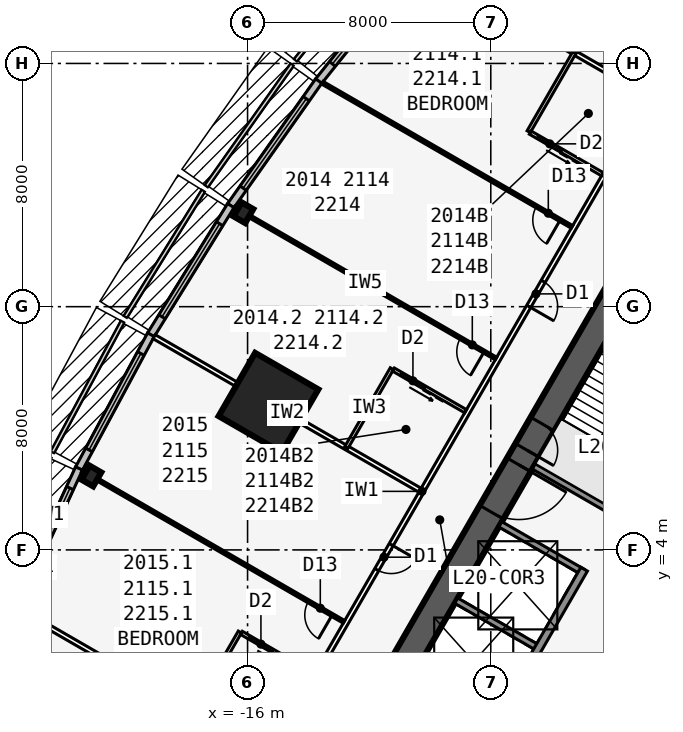
"""IFC4 building model, lengths in metres.
Left out: names, types, materials, properties, quantities, classifications, styles, units other than length and angle.
Written with IfcOpenShell. Run it as: python <this file> out.ifc"""

import sys

from ifc_helpers import new_model, si_unit, direction, frame, frame_2d, origin, origin_2d, place, context, subcontext, project, spatial, rectangle, i_section, extrude, element, fill, save


model = new_model("IFC4")
c1 = context("Model", 3, precision=1e-05, world=origin(), true_north=direction((0.0, 1.0)))
c2 = subcontext(c1, "Body", "Model", "MODEL_VIEW")
j1 = project(units=[si_unit("LENGTHUNIT", "METRE"), si_unit("PLANEANGLEUNIT", "RADIAN")], contexts=[c1])
p1 = place(None, origin())
s1 = spatial("IfcSite", under=j1, at=p1, CompositionType="ELEMENT")
p2 = place(p1, origin())
s2 = spatial("IfcBuilding", under=s1, at=p2, CompositionType="ELEMENT")
p3 = place(p2, frame((0.0, 0.0, 79.5)))
s3 = spatial("IfcBuildingStorey", under=s2, at=p3, CompositionType="ELEMENT", Elevation=79.5)
p4 = place(p3, frame((0.0, 19.052, 0.0), z_axis=(0.0, 0.0, 1.0), x_axis=(-0.499999749417, -0.866025548458, 0.0)))
e1 = element("IfcWall", 1, at=p4, inside=s3, PredefinedType="SHEAR", context=c2, shape_type="SweptSolid", body=[
    extrude(rectangle(XDim=33.0, YDim=0.9, at=frame_2d((16.5, 0.0))), origin(), (0.0, 0.0, 1.0), 3.4),
])
p5 = place(p4, frame((14.15, 0.0, 0.0)))
e2 = element("IfcOpeningElement", 2, at=p5, cuts=e1, PredefinedType="OPENING", context=c2, shape_type="SweptSolid", body=[
    extrude(rectangle(XDim=1.8, YDim=2.13, at=frame_2d((0.9, 1.065))), frame((0.0, 0.46, 0.0), z_axis=(0.0, -1.0, 0.0), x_axis=(1.0, 0.0, 0.0)), (0.0, 0.0, 1.0), 0.92),
])
p6 = place(p4, frame((12.6, 0.0, 0.0)))
e3 = element("IfcOpeningElement", 3, at=p6, cuts=e1, PredefinedType="OPENING", context=c2, shape_type="SweptSolid", body=[
    extrude(rectangle(XDim=1.0, YDim=2.13, at=frame_2d((0.5, 1.065))), frame((0.0, 0.46, 0.0), z_axis=(0.0, -1.0, 0.0), x_axis=(1.0, 0.0, 0.0)), (0.0, 0.0, 1.0), 0.92),
])
p7 = place(p3, frame((-4.929, 3.365, 0.0), z_axis=(0.0, 0.0, 1.0), x_axis=(-0.499991433582, -0.866030349552, 0.0)))
e4 = element("IfcWall", 4, at=p7, inside=s3, PredefinedType="SOLIDWALL", context=c2, shape_type="SweptSolid", body=[
    extrude(rectangle(XDim=10.633, YDim=0.25, at=frame_2d((5.316, 0.0))), origin(), (0.0, 0.0, 1.0), 3.235),
])
p8 = place(p7, frame((9.164, 0.0, 0.0)))
e5 = element("IfcOpeningElement", 5, at=p8, cuts=e4, PredefinedType="OPENING", context=c2, shape_type="SweptSolid", body=[
    extrude(rectangle(XDim=0.9, YDim=2.13, at=frame_2d((0.45, 1.065))), frame((0.0, 0.135, 0.0), z_axis=(0.0, -1.0, 0.0), x_axis=(1.0, 0.0, 0.0)), (0.0, 0.0, 1.0), 0.27),
])
for number, where, z_axis, x_axis in (
    (6, (-3.879, 5.184, 0.0), (0.0, 0.0, 1.0), (-0.866, 0.5, 0.0)),
    (7, (-4.979, 3.279, 0.0), (0.0, 0.0, 1.0), (-0.866, 0.5, 0.0)),
    (8, (-6.429, 0.767, 0.0), (0.0, 0.0, 1.0), (-0.866, 0.5, 0.0)),
):
    element("IfcWall", number, at=place(p3, frame(where, z_axis=z_axis, x_axis=x_axis)), inside=s3, PredefinedType="SOLIDWALL", context=c2, shape_type="SweptSolid", body=[
        extrude(rectangle(XDim=3.125, YDim=0.2, at=frame_2d((1.562, 0.0))), origin(), (0.0, 0.0, 1.0), 3.235),
    ])
for number, where, z_axis, x_axis in (
    (9, (-16.137, 15.09, 0.0), (0.0, 0.0, 1.0), (-0.866, 0.5, 0.0)),
    (10, (-21.137, 6.43, 0.0), (0.0, 0.0, 1.0), (-0.866, 0.5, 0.0)),
):
    element("IfcColumn", number, at=place(p3, frame(where, z_axis=z_axis, x_axis=x_axis)), inside=s3, PredefinedType="COLUMN", context=c2, shape_type="SweptSolid", body=[
        extrude(i_section(OverallWidth=0.442, OverallDepth=0.531, WebThickness=0.066, FlangeThickness=0.106, at=origin_2d()), origin(), (0.0, 0.0, 1.0), 3.4),
    ])
p9 = place(p3, frame((-15.312, 8.84, 0.0), z_axis=(0.0, 0.0, 1.0), x_axis=(-0.866025403784, 0.5, 0.0)))
e11 = element("IfcColumn", 11, at=p9, inside=s3, PredefinedType="COLUMN", context=c2, shape_type="SweptSolid", body=[
    extrude(rectangle(XDim=2.4, YDim=2.4, at=origin_2d()), origin(), (0.0, 0.0, 1.0), 3.4),
])
p10 = place(p3, frame((-10.505, 23.364, 0.0), z_axis=(0.0, 0.0, 1.0), x_axis=(-0.624594965756, -0.780948864364, 0.0)))
e12 = element("IfcWall", 12, at=p10, inside=s3, PredefinedType="STANDARD", context=c2, shape_type="SweptSolid", body=[
    extrude(rectangle(XDim=5.058, YDim=0.25, at=frame_2d((2.529, 0.0))), origin(), (0.0, 0.0, 1.0), 3.235),
])
p11 = place(p10, frame((0.729, 0.0, 0.45)))
e13 = element("IfcOpeningElement", 13, at=p11, cuts=e12, PredefinedType="OPENING", context=c2, shape_type="SweptSolid", body=[
    extrude(rectangle(XDim=3.6, YDim=2.4, at=frame_2d((1.8, 1.2))), frame((0.0, 0.135, 0.0), z_axis=(0.0, -1.0, 0.0), x_axis=(1.0, 0.0, 0.0)), (0.0, 0.0, 1.0), 0.27),
])
p12 = place(p3, frame((-13.659, 19.42, 0.0), z_axis=(0.0, 0.0, 1.0), x_axis=(-0.5766431066, -0.81699616132, 0.0)))
e14 = element("IfcWall", 14, at=p12, inside=s3, PredefinedType="STANDARD", context=c2, shape_type="SweptSolid", body=[
    extrude(rectangle(XDim=5.021, YDim=0.25, at=frame_2d((2.51, 0.0))), origin(), (0.0, 0.0, 1.0), 3.235),
])
p13 = place(p12, frame((0.71, 0.0, 0.45)))
e15 = element("IfcOpeningElement", 15, at=p13, cuts=e14, PredefinedType="OPENING", context=c2, shape_type="SweptSolid", body=[
    extrude(rectangle(XDim=3.6, YDim=2.4, at=frame_2d((1.8, 1.2))), frame((0.0, 0.135, 0.0), z_axis=(0.0, -1.0, 0.0), x_axis=(1.0, 0.0, 0.0)), (0.0, 0.0, 1.0), 0.27),
])
p14 = place(p3, frame((-16.551, 15.324, 0.0), z_axis=(0.0, 0.0, 1.0), x_axis=(-0.526132807704, -0.850402415717, 0.0)))
e16 = element("IfcWall", 16, at=p14, inside=s3, PredefinedType="STANDARD", context=c2, shape_type="SweptSolid", body=[
    extrude(rectangle(XDim=5.002, YDim=0.25, at=frame_2d((2.501, 0.0))), origin(), (0.0, 0.0, 1.0), 3.235),
])
p15 = place(p14, frame((0.701, 0.0, 0.45)))
e17 = element("IfcOpeningElement", 17, at=p15, cuts=e16, PredefinedType="OPENING", context=c2, shape_type="SweptSolid", body=[
    extrude(rectangle(XDim=3.6, YDim=2.4, at=frame_2d((1.8, 1.2))), frame((0.0, 0.135, 0.0), z_axis=(0.0, -1.0, 0.0), x_axis=(1.0, 0.0, 0.0)), (0.0, 0.0, 1.0), 0.27),
])
p16 = place(p3, frame((-19.178, 11.077, 0.0), z_axis=(0.0, 0.0, 1.0), x_axis=(-0.473412820489, -0.880840678782, 0.0)))
e18 = element("IfcWall", 18, at=p16, inside=s3, PredefinedType="STANDARD", context=c2, shape_type="SweptSolid", body=[
    extrude(rectangle(XDim=5.002, YDim=0.25, at=frame_2d((2.501, 0.0))), origin(), (0.0, 0.0, 1.0), 3.235),
])
p17 = place(p16, frame((0.701, 0.0, 0.45)))
e19 = element("IfcOpeningElement", 19, at=p17, cuts=e18, PredefinedType="OPENING", context=c2, shape_type="SweptSolid", body=[
    extrude(rectangle(XDim=3.6, YDim=2.4, at=frame_2d((1.8, 1.2))), frame((0.0, 0.135, 0.0), z_axis=(0.0, -1.0, 0.0), x_axis=(1.0, 0.0, 0.0)), (0.0, 0.0, 1.0), 0.27),
])
p18 = place(p3, frame((-21.543, 6.678, 0.0), z_axis=(0.0, 0.0, 1.0), x_axis=(-0.419203100754, -0.907892482796, 0.0)))
e20 = element("IfcWall", 20, at=p18, inside=s3, PredefinedType="STANDARD", context=c2, shape_type="SweptSolid", body=[
    extrude(rectangle(XDim=5.021, YDim=0.25, at=frame_2d((2.51, 0.0))), origin(), (0.0, 0.0, 1.0), 3.235),
])
p19 = place(p18, frame((0.71, 0.0, 0.45)))
e21 = element("IfcOpeningElement", 21, at=p19, cuts=e20, PredefinedType="OPENING", context=c2, shape_type="SweptSolid", body=[
    extrude(rectangle(XDim=3.6, YDim=2.4, at=frame_2d((1.8, 1.2))), frame((0.0, 0.135, 0.0), z_axis=(0.0, -1.0, 0.0), x_axis=(1.0, 0.0, 0.0)), (0.0, 0.0, 1.0), 0.27),
])
p20 = place(p3, frame((-0.5, 22.836, 0.0), z_axis=(0.0, 0.0, 1.0), x_axis=(-0.500001677587, -0.866024435227, 0.0)))
e22 = element("IfcWall", 22, at=p20, inside=s3, PredefinedType="PARTITIONING", context=c2, shape_type="SweptSolid", body=[
    extrude(rectangle(XDim=39.054, YDim=0.15, at=frame_2d((19.527, 0.0))), origin(), (0.0, 0.0, 1.0), 3.235),
])
p21 = place(p20, frame((0.352, 0.0, 0.0)))
e23 = element("IfcOpeningElement", 23, at=p21, cuts=e22, PredefinedType="OPENING", context=c2, shape_type="SweptSolid", body=[
    extrude(rectangle(XDim=0.95, YDim=2.13, at=frame_2d((0.475, 1.065))), frame((0.0, 0.085, 0.0), z_axis=(0.0, -1.0, 0.0), x_axis=(1.0, 0.0, 0.0)), (0.0, 0.0, 1.0), 0.17),
])
p22 = place(p20, frame((11.552, 0.0, 0.0)))
e24 = element("IfcOpeningElement", 24, at=p22, cuts=e22, PredefinedType="OPENING", context=c2, shape_type="SweptSolid", body=[
    extrude(rectangle(XDim=0.95, YDim=2.13, at=frame_2d((0.475, 1.065))), frame((0.0, 0.085, 0.0), z_axis=(0.0, -1.0, 0.0), x_axis=(1.0, 0.0, 0.0)), (0.0, 0.0, 1.0), 0.17),
])
p23 = place(p20, frame((21.552, 0.0, 0.0)))
e25 = element("IfcOpeningElement", 25, at=p23, cuts=e22, PredefinedType="OPENING", context=c2, shape_type="SweptSolid", body=[
    extrude(rectangle(XDim=0.95, YDim=2.13, at=frame_2d((0.475, 1.065))), frame((0.0, 0.085, 0.0), z_axis=(0.0, -1.0, 0.0), x_axis=(1.0, 0.0, 0.0)), (0.0, 0.0, 1.0), 0.17),
])
p24 = place(p20, frame((36.546, 0.0, 0.0)))
e26 = element("IfcOpeningElement", 26, at=p24, cuts=e22, PredefinedType="OPENING", context=c2, shape_type="SweptSolid", body=[
    extrude(rectangle(XDim=0.95, YDim=2.13, at=frame_2d((0.475, 1.065))), frame((0.0, 0.085, 0.0), z_axis=(0.0, -1.0, 0.0), x_axis=(1.0, 0.0, 0.0)), (0.0, 0.0, 1.0), 0.17),
])
p25 = place(p3, frame((-2.829, 18.954, 0.0), z_axis=(0.0, 0.0, 1.0), x_axis=(-0.866020536561, 0.500008430184, 0.0)))
e27 = element("IfcWall", 27, at=p25, inside=s3, PredefinedType="PARTITIONING", context=c2, shape_type="SweptSolid", body=[
    extrude(rectangle(XDim=8.72, YDim=0.15, at=frame_2d((4.36, 0.0))), origin(), (0.0, 0.0, 1.0), 2.389),
])
p26 = place(p3, frame((-5.329, 14.623, 0.0), z_axis=(0.0, 0.0, 1.0), x_axis=(-0.866018409083, 0.500012114982, 0.0)))
e28 = element("IfcWall", 28, at=p26, inside=s3, PredefinedType="PARTITIONING", context=c2, shape_type="SweptSolid", body=[
    extrude(rectangle(XDim=9.485, YDim=0.1, at=frame_2d((4.742, 0.0))), origin(), (0.0, 0.0, 1.0), 2.389),
])
p27 = place(p26, frame((0.45, 0.0, 0.0)))
e29 = element("IfcOpeningElement", 29, at=p27, cuts=e28, PredefinedType="OPENING", context=c2, shape_type="SweptSolid", body=[
    extrude(rectangle(XDim=0.9, YDim=2.13, at=frame_2d((0.45, 1.065))), frame((0.0, 0.06, 0.0), z_axis=(0.0, -1.0, 0.0), x_axis=(1.0, 0.0, 0.0)), (0.0, 0.0, 1.0), 0.12),
])
p28 = place(p3, frame((-7.829, 10.293, 0.0), z_axis=(0.0, 0.0, 1.0), x_axis=(-0.866016302457, 0.50001576363, 0.0)))
e30 = element("IfcWall", 30, at=p28, inside=s3, PredefinedType="PARTITIONING", context=c2, shape_type="SweptSolid", body=[
    extrude(rectangle(XDim=9.943, YDim=0.1, at=frame_2d((4.972, 0.0))), origin(), (0.0, 0.0, 1.0), 2.389),
])
p29 = place(p28, frame((0.45, 0.0, 0.0)))
e31 = element("IfcOpeningElement", 31, at=p29, cuts=e30, PredefinedType="OPENING", context=c2, shape_type="SweptSolid", body=[
    extrude(rectangle(XDim=0.9, YDim=2.13, at=frame_2d((0.45, 1.065))), frame((0.0, 0.06, 0.0), z_axis=(0.0, -1.0, 0.0), x_axis=(1.0, 0.0, 0.0)), (0.0, 0.0, 1.0), 0.12),
])
p30 = place(p3, frame((-10.329, 5.963, 0.0), z_axis=(0.0, 0.0, 1.0), x_axis=(-0.866021688545, 0.500006434927, 0.0)))
e32 = element("IfcWall", 32, at=p30, inside=s3, PredefinedType="PARTITIONING", context=c2, shape_type="SweptSolid", body=[
    extrude(rectangle(XDim=10.096, YDim=0.15, at=frame_2d((5.048, 0.0))), origin(), (0.0, 0.0, 1.0), 2.389),
])
p31 = place(p3, frame((-12.829, 1.633, 0.0), z_axis=(0.0, 0.0, 1.0), x_axis=(-0.866026934769, 0.499997348248, 0.0)))
e33 = element("IfcWall", 33, at=p31, inside=s3, PredefinedType="PARTITIONING", context=c2, shape_type="SweptSolid", body=[
    extrude(rectangle(XDim=9.943, YDim=0.1, at=frame_2d((4.971, 0.0))), origin(), (0.0, 0.0, 1.0), 2.389),
])
p32 = place(p31, frame((0.45, 0.0, 0.0)))
e34 = element("IfcOpeningElement", 34, at=p32, cuts=e33, PredefinedType="OPENING", context=c2, shape_type="SweptSolid", body=[
    extrude(rectangle(XDim=0.9, YDim=2.13, at=frame_2d((0.45, 1.065))), frame((0.0, 0.06, 0.0), z_axis=(0.0, -1.0, 0.0), x_axis=(1.0, 0.0, 0.0)), (0.0, 0.0, 1.0), 0.12),
])
p33 = place(p3, frame((-15.329, -2.697, 0.0), z_axis=(0.0, 0.0, 1.0), x_axis=(-0.866018409083, 0.500012114982, 0.0)))
e35 = element("IfcWall", 35, at=p33, inside=s3, PredefinedType="PARTITIONING", context=c2, shape_type="SweptSolid", body=[
    extrude(rectangle(XDim=9.485, YDim=0.15, at=frame_2d((4.742, 0.0))), origin(), (0.0, 0.0, 1.0), 2.389),
])
for number, where, z_axis, x_axis in (
    (36, (-3.753, 22.952, 0.0), (0.0, 0.0, 1.0), (-0.5, -0.866, 0.0)),
    (37, (-5.253, 20.354, 0.0), (0.0, 0.0, 1.0), (-0.5, -0.866, 0.0)),
):
    element("IfcWall", number, at=place(p3, frame(where, z_axis=z_axis, x_axis=x_axis)), inside=s3, PredefinedType="PLUMBINGWALL", context=c2, shape_type="SweptSolid", body=[
        extrude(rectangle(XDim=3.0, YDim=0.12, at=frame_2d((1.5, 0.0))), origin(), (0.0, 0.0, 1.0), 3.235),
    ])
p34 = place(p3, frame((-4.329, 16.355, 0.0), z_axis=(0.0, 0.0, 1.0), x_axis=(-0.866035715982, 0.499982138324, 0.0)))
e38 = element("IfcWall", 38, at=p34, inside=s3, PredefinedType="PLUMBINGWALL", context=c2, shape_type="SweptSolid", body=[
    extrude(rectangle(XDim=2.74, YDim=0.12, at=frame_2d((1.37, 0.0))), origin(), (0.0, 0.0, 1.0), 3.235),
])
p35 = place(p34, frame((1.55, 0.0, 0.0)))
e39 = element("IfcOpeningElement", 39, at=p35, cuts=e38, PredefinedType="OPENING", context=c2, shape_type="SweptSolid", body=[
    extrude(rectangle(XDim=0.9, YDim=2.13, at=frame_2d((0.45, 1.065))), frame((0.0, 0.07, 0.0), z_axis=(0.0, -1.0, 0.0), x_axis=(1.0, 0.0, 0.0)), (0.0, 0.0, 1.0), 0.14),
])
p36 = place(p3, frame((-11.253, 9.961, 0.0), z_axis=(0.0, 0.0, 1.0), x_axis=(-0.499990139034, -0.866031096941, 0.0)))
e40 = element("IfcWall", 40, at=p36, inside=s3, PredefinedType="PLUMBINGWALL", context=c2, shape_type="SweptSolid", body=[
    extrude(rectangle(XDim=3.0, YDim=0.12, at=frame_2d((1.5, 0.0))), origin(), (0.0, 0.0, 1.0), 3.235),
])
p37 = place(p3, frame((-8.829, 8.561, 0.0), z_axis=(0.0, 0.0, 1.0), x_axis=(-0.866035715982, 0.499982138324, 0.0)))
e41 = element("IfcWall", 41, at=p37, inside=s3, PredefinedType="PLUMBINGWALL", context=c2, shape_type="SweptSolid", body=[
    extrude(rectangle(XDim=2.74, YDim=0.12, at=frame_2d((1.37, 0.0))), origin(), (0.0, 0.0, 1.0), 3.235),
])
p38 = place(p37, frame((1.55, 0.0, 0.0)))
e42 = element("IfcOpeningElement", 42, at=p38, cuts=e41, PredefinedType="OPENING", context=c2, shape_type="SweptSolid", body=[
    extrude(rectangle(XDim=0.9, YDim=2.13, at=frame_2d((0.45, 1.065))), frame((0.0, 0.07, 0.0), z_axis=(0.0, -1.0, 0.0), x_axis=(1.0, 0.0, 0.0)), (0.0, 0.0, 1.0), 0.14),
])
p39 = place(p3, frame((-16.253, 1.301, 0.0), z_axis=(0.0, 0.0, 1.0), x_axis=(-0.499990139034, -0.866031096941, 0.0)))
e43 = element("IfcWall", 43, at=p39, inside=s3, PredefinedType="PLUMBINGWALL", context=c2, shape_type="SweptSolid", body=[
    extrude(rectangle(XDim=3.0, YDim=0.12, at=frame_2d((1.5, 0.0))), origin(), (0.0, 0.0, 1.0), 3.235),
])
p40 = place(p3, frame((-13.829, -0.099, 0.0), z_axis=(0.0, 0.0, 1.0), x_axis=(-0.865997131366, 0.500048966069, 0.0)))
e44 = element("IfcWall", 44, at=p40, inside=s3, PredefinedType="PLUMBINGWALL", context=c2, shape_type="SweptSolid", body=[
    extrude(rectangle(XDim=2.74, YDim=0.12, at=frame_2d((1.37, 0.0))), origin(), (0.0, 0.0, 1.0), 3.235),
])
p41 = place(p40, frame((1.55, 0.0, 0.0)))
e45 = element("IfcOpeningElement", 45, at=p41, cuts=e44, PredefinedType="OPENING", context=c2, shape_type="SweptSolid", body=[
    extrude(rectangle(XDim=0.9, YDim=2.13, at=frame_2d((0.45, 1.065))), frame((0.0, 0.07, 0.0), z_axis=(0.0, -1.0, 0.0), x_axis=(1.0, 0.0, 0.0)), (0.0, 0.0, 1.0), 0.14),
])
p42 = place(p3, frame((-2.988, 9.978, 0.0), z_axis=(0.0, 0.0, 1.0), x_axis=(-0.499992232847, -0.866029888106, 0.0)))
e46 = element("IfcWall", 46, at=p42, inside=s3, PredefinedType="SOLIDWALL", context=c2, shape_type="SweptSolid", body=[
    extrude(rectangle(XDim=2.794, YDim=0.1, at=frame_2d((1.397, 0.0))), origin(), (0.0, 0.0, 1.0), 3.4),
])
p43 = place(p11, origin())
e47 = element("IfcWindow", 47, at=p43, inside=s3, PartitioningType="SINGLE_PANEL", PredefinedType="WINDOW", context=c2, shape_type="SweptSolid", body=[
    extrude(rectangle(XDim=3.6, YDim=2.4, at=frame_2d((1.8, 1.2))), frame((0.0, 0.03, 0.0), z_axis=(0.0, -1.0, 0.0), x_axis=(1.0, 0.0, 0.0)), (0.0, 0.0, 1.0), 0.06),
])
fill(e13, e47)
p44 = place(p13, origin())
e48 = element("IfcWindow", 48, at=p44, inside=s3, PartitioningType="SINGLE_PANEL", PredefinedType="WINDOW", context=c2, shape_type="SweptSolid", body=[
    extrude(rectangle(XDim=3.6, YDim=2.4, at=frame_2d((1.8, 1.2))), frame((0.0, 0.03, 0.0), z_axis=(0.0, -1.0, 0.0), x_axis=(1.0, 0.0, 0.0)), (0.0, 0.0, 1.0), 0.06),
])
fill(e15, e48)
p45 = place(p15, origin())
e49 = element("IfcWindow", 49, at=p45, inside=s3, PartitioningType="SINGLE_PANEL", PredefinedType="WINDOW", context=c2, shape_type="SweptSolid", body=[
    extrude(rectangle(XDim=3.6, YDim=2.4, at=frame_2d((1.8, 1.2))), frame((0.0, 0.03, 0.0), z_axis=(0.0, -1.0, 0.0), x_axis=(1.0, 0.0, 0.0)), (0.0, 0.0, 1.0), 0.06),
])
fill(e17, e49)
p46 = place(p17, origin())
e50 = element("IfcWindow", 50, at=p46, inside=s3, PartitioningType="SINGLE_PANEL", PredefinedType="WINDOW", context=c2, shape_type="SweptSolid", body=[
    extrude(rectangle(XDim=3.6, YDim=2.4, at=frame_2d((1.8, 1.2))), frame((0.0, 0.03, 0.0), z_axis=(0.0, -1.0, 0.0), x_axis=(1.0, 0.0, 0.0)), (0.0, 0.0, 1.0), 0.06),
])
fill(e19, e50)
p47 = place(p19, origin())
e51 = element("IfcWindow", 51, at=p47, inside=s3, PartitioningType="SINGLE_PANEL", PredefinedType="WINDOW", context=c2, shape_type="SweptSolid", body=[
    extrude(rectangle(XDim=3.6, YDim=2.4, at=frame_2d((1.8, 1.2))), frame((0.0, 0.03, 0.0), z_axis=(0.0, -1.0, 0.0), x_axis=(1.0, 0.0, 0.0)), (0.0, 0.0, 1.0), 0.06),
])
fill(e21, e51)
p48 = place(p27, origin())
e52 = element("IfcDoor", 52, at=p48, inside=s3, OperationType="SINGLE_SWING_LEFT", PredefinedType="DOOR", context=c2, shape_type="SweptSolid", body=[
    extrude(rectangle(XDim=0.9, YDim=2.13, at=frame_2d((0.45, 1.065))), frame((0.0, 0.025, 0.0), z_axis=(0.0, -1.0, 0.0), x_axis=(1.0, 0.0, 0.0)), (0.0, 0.0, 1.0), 0.05),
])
fill(e29, e52)
p49 = place(p29, origin())
e53 = element("IfcDoor", 53, at=p49, inside=s3, OperationType="SINGLE_SWING_LEFT", PredefinedType="DOOR", context=c2, shape_type="SweptSolid", body=[
    extrude(rectangle(XDim=0.9, YDim=2.13, at=frame_2d((0.45, 1.065))), frame((0.0, 0.025, 0.0), z_axis=(0.0, -1.0, 0.0), x_axis=(1.0, 0.0, 0.0)), (0.0, 0.0, 1.0), 0.05),
])
fill(e31, e53)
p50 = place(p32, origin())
e54 = element("IfcDoor", 54, at=p50, inside=s3, OperationType="SINGLE_SWING_LEFT", PredefinedType="DOOR", context=c2, shape_type="SweptSolid", body=[
    extrude(rectangle(XDim=0.9, YDim=2.13, at=frame_2d((0.45, 1.065))), frame((0.0, 0.025, 0.0), z_axis=(0.0, -1.0, 0.0), x_axis=(1.0, 0.0, 0.0)), (0.0, 0.0, 1.0), 0.05),
])
fill(e34, e54)
p51 = place(p35, origin())
e55 = element("IfcDoor", 55, at=p51, inside=s3, OperationType="SLIDING_TO_LEFT", PredefinedType="DOOR", context=c2, shape_type="SweptSolid", body=[
    extrude(rectangle(XDim=0.9, YDim=2.13, at=frame_2d((0.45, 1.065))), frame((0.0, 0.025, 0.0), z_axis=(0.0, -1.0, 0.0), x_axis=(1.0, 0.0, 0.0)), (0.0, 0.0, 1.0), 0.05),
])
fill(e39, e55)
p52 = place(p22, origin())
e56 = element("IfcDoor", 56, at=p52, inside=s3, OperationType="SINGLE_SWING_RIGHT", PredefinedType="DOOR", context=c2, shape_type="SweptSolid", body=[
    extrude(rectangle(XDim=0.95, YDim=2.13, at=frame_2d((0.475, 1.065))), frame((0.0, 0.025, 0.0), z_axis=(0.0, -1.0, 0.0), x_axis=(1.0, 0.0, 0.0)), (0.0, 0.0, 1.0), 0.05),
])
fill(e24, e56)
p53 = place(p38, origin())
e57 = element("IfcDoor", 57, at=p53, inside=s3, OperationType="SLIDING_TO_LEFT", PredefinedType="DOOR", context=c2, shape_type="SweptSolid", body=[
    extrude(rectangle(XDim=0.9, YDim=2.13, at=frame_2d((0.45, 1.065))), frame((0.0, 0.025, 0.0), z_axis=(0.0, -1.0, 0.0), x_axis=(1.0, 0.0, 0.0)), (0.0, 0.0, 1.0), 0.05),
])
fill(e42, e57)
p54 = place(p23, origin())
e58 = element("IfcDoor", 58, at=p54, inside=s3, OperationType="SINGLE_SWING_LEFT", PredefinedType="DOOR", context=c2, shape_type="SweptSolid", body=[
    extrude(rectangle(XDim=0.95, YDim=2.13, at=frame_2d((0.475, 1.065))), frame((0.0, 0.025, 0.0), z_axis=(0.0, -1.0, 0.0), x_axis=(1.0, 0.0, 0.0)), (0.0, 0.0, 1.0), 0.05),
])
fill(e25, e58)
p55 = place(p41, origin())
e59 = element("IfcDoor", 59, at=p55, inside=s3, OperationType="SLIDING_TO_LEFT", PredefinedType="DOOR", context=c2, shape_type="SweptSolid", body=[
    extrude(rectangle(XDim=0.9, YDim=2.13, at=frame_2d((0.45, 1.065))), frame((0.0, 0.025, 0.0), z_axis=(0.0, -1.0, 0.0), x_axis=(1.0, 0.0, 0.0)), (0.0, 0.0, 1.0), 0.05),
])
fill(e45, e59)
p56 = place(p5, origin())
e60 = element("IfcDoor", 60, at=p56, inside=s3, OperationType="DOUBLE_DOOR_SINGLE_SWING", PredefinedType="DOOR", context=c2, shape_type="SweptSolid", body=[
    extrude(rectangle(XDim=1.8, YDim=2.13, at=frame_2d((0.9, 1.065))), frame((0.0, 0.025, 0.0), z_axis=(0.0, -1.0, 0.0), x_axis=(1.0, 0.0, 0.0)), (0.0, 0.0, 1.0), 0.05),
])
fill(e2, e60)
p57 = place(p6, origin())
e61 = element("IfcDoor", 61, at=p57, inside=s3, OperationType="SINGLE_SWING_RIGHT", PredefinedType="DOOR", context=c2, shape_type="SweptSolid", body=[
    extrude(rectangle(XDim=1.0, YDim=2.13, at=frame_2d((0.5, 1.065))), frame((0.0, 0.025, 0.0), z_axis=(0.0, -1.0, 0.0), x_axis=(1.0, 0.0, 0.0)), (0.0, 0.0, 1.0), 0.05),
])
fill(e3, e61)
save(model, sys.argv[1])
